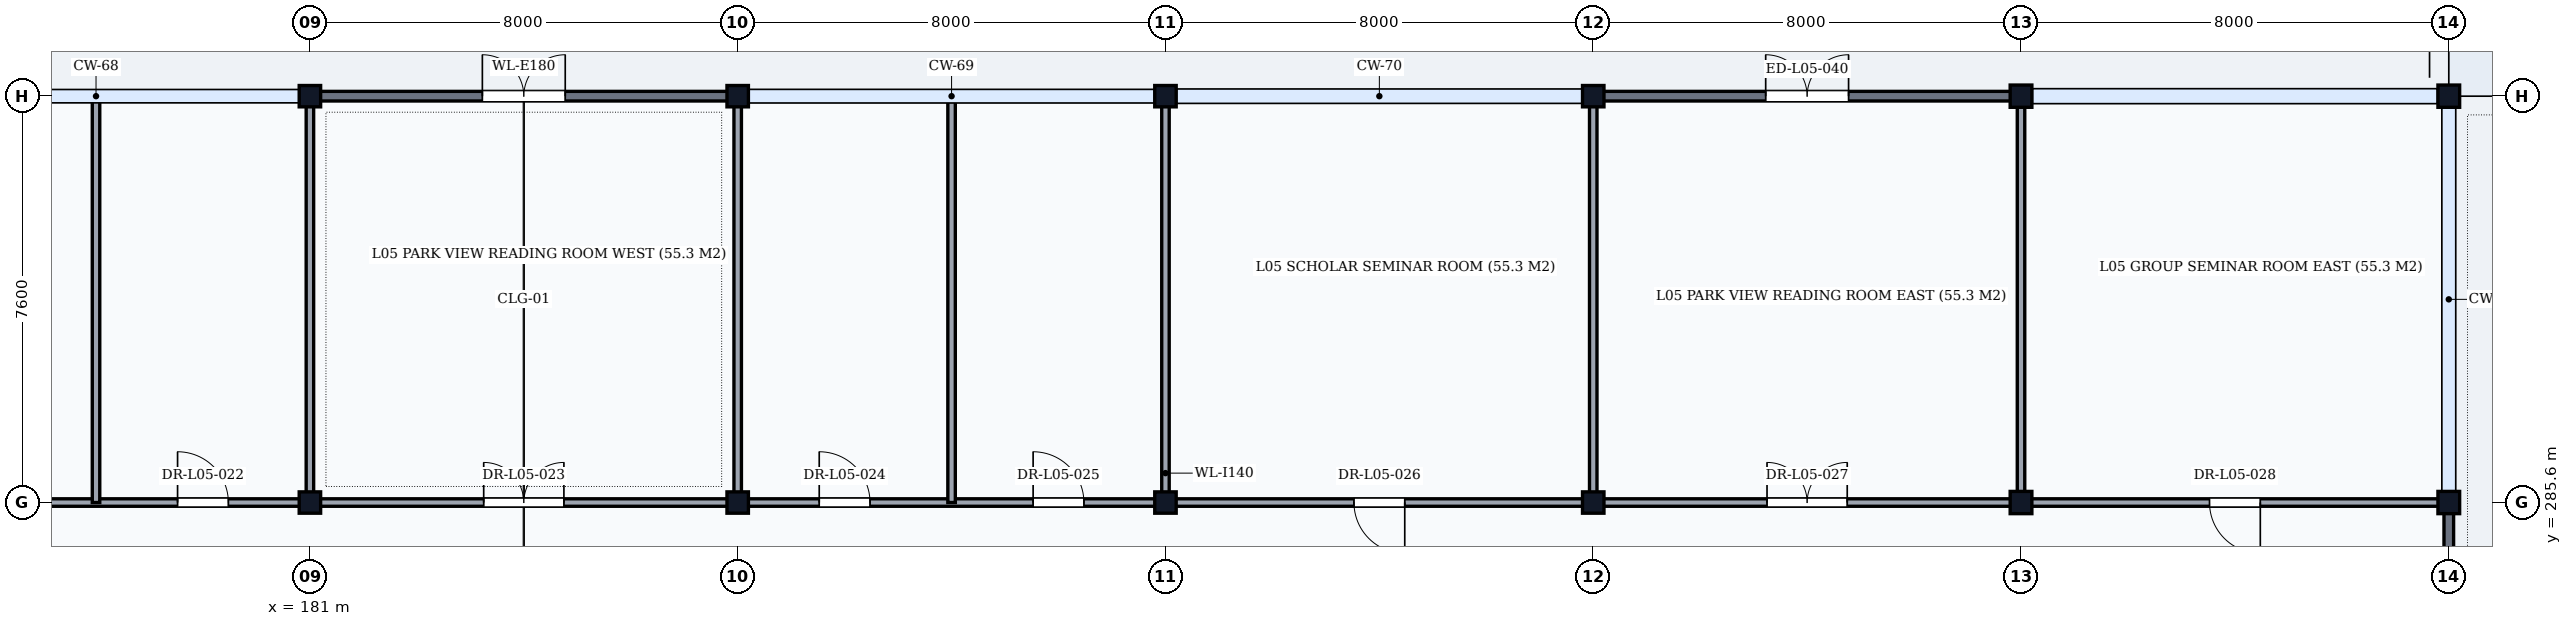
"""IFC4 building model, lengths in metres.
Left out: names, types, materials, properties, quantities, classifications, styles, units other than length and angle.
Written with IfcOpenShell. Run it as: python <this file> out.ifc"""

import sys

from ifc_helpers import new_model, si_unit, direction, frame, frame_2d, origin, origin_2d, place, context, subcontext, project, spatial, rectangle, i_section, extrude, element, fill, save


model = new_model("IFC4")
c1 = context("Model", 3, precision=1e-05, world=origin(), true_north=direction((0.0, 1.0)))
c2 = subcontext(c1, "Body", "Model", "MODEL_VIEW")
j1 = project(units=[si_unit("LENGTHUNIT", "METRE"), si_unit("PLANEANGLEUNIT", "RADIAN")], contexts=[c1])
p1 = place(None, origin())
s1 = spatial("IfcSite", under=j1, at=p1, CompositionType="ELEMENT")
p2 = place(p1, origin())
s2 = spatial("IfcBuilding", under=s1, at=p2, CompositionType="ELEMENT")
p3 = place(p2, frame((0.0, 0.0, 20.4)))
s3 = spatial("IfcBuildingStorey", under=s2, at=p3, CompositionType="ELEMENT", Elevation=20.4)
for number, where, z_axis, x_axis in (
    (1, (181.0, 285.6, 0.0), (0.0, 0.0, 1.0), (1.0, 0.0, 0.0)),
    (2, (181.0, 293.2, 0.0), (0.0, 0.0, 1.0), (1.0, 0.0, 0.0)),
    (3, (189.0, 285.6, 0.0), (0.0, 0.0, 1.0), (1.0, 0.0, 0.0)),
    (4, (189.0, 293.2, 0.0), (0.0, 0.0, 1.0), (1.0, 0.0, 0.0)),
    (5, (197.0, 285.6, 0.0), (0.0, 0.0, 1.0), (1.0, 0.0, 0.0)),
    (6, (197.0, 293.2, 0.0), (0.0, 0.0, 1.0), (1.0, 0.0, 0.0)),
    (7, (205.0, 285.6, 0.0), (0.0, 0.0, 1.0), (1.0, 0.0, 0.0)),
    (8, (205.0, 293.2, 0.0), (0.0, 0.0, 1.0), (1.0, 0.0, 0.0)),
):
    element("IfcColumn", number, at=place(p3, frame(where, z_axis=z_axis, x_axis=x_axis)), inside=s3, PredefinedType="COLUMN", context=c2, shape_type="SweptSolid", body=[
        extrude(i_section(OverallWidth=0.401, OverallDepth=0.399, WebThickness=0.025, FlangeThickness=0.04, FilletRadius=0.015, at=origin_2d()), origin(), (0.0, 0.0, 1.0), 3.9),
    ])
for number, where, z_axis, x_axis in (
    (9, (213.0, 285.6, 0.0), (0.0, 0.0, 1.0), (1.0, 0.0, 0.0)),
    (10, (213.0, 293.2, 0.0), (0.0, 0.0, 1.0), (1.0, 0.0, 0.0)),
    (11, (221.0, 285.6, 0.0), (0.0, 0.0, 1.0), (1.0, 0.0, 0.0)),
    (12, (221.0, 293.2, 0.0), (0.0, 0.0, 1.0), (1.0, 0.0, 0.0)),
):
    element("IfcColumn", number, at=place(p3, frame(where, z_axis=z_axis, x_axis=x_axis)), inside=s3, PredefinedType="COLUMN", context=c2, shape_type="SweptSolid", body=[
        extrude(i_section(OverallWidth=0.406, OverallDepth=0.416, WebThickness=0.03, FlangeThickness=0.048, FilletRadius=0.015, at=origin_2d()), origin(), (0.0, 0.0, 1.0), 3.9),
    ])
p4 = place(p3, frame((181.006, 293.2, 0.0), z_axis=(0.0, 0.0, 1.0), x_axis=(1.0, 0.0, 0.0)))
e13 = element("IfcWall", 13, at=p4, inside=s3, PredefinedType="SOLIDWALL", context=c2, shape_type="SweptSolid", body=[
    extrude(rectangle(XDim=7.988, YDim=0.18, at=frame_2d((3.994, 0.0))), origin(), (0.0, 0.0, 1.0), 3.348),
])
p5 = place(p4, frame((3.219, 0.0, 0.0)))
e14 = element("IfcOpeningElement", 14, at=p5, cuts=e13, PredefinedType="OPENING", context=c2, shape_type="SweptSolid", body=[
    extrude(rectangle(XDim=1.55, YDim=2.2, at=frame_2d((0.775, 1.1))), frame((0.0, 0.105, 0.0), z_axis=(0.0, -1.0, 0.0), x_axis=(1.0, 0.0, 0.0)), (0.0, 0.0, 1.0), 0.21),
])
p6 = place(p3, frame((205.006, 293.2, 0.0), z_axis=(0.0, 0.0, 1.0), x_axis=(1.0, 0.0, 0.0)))
e15 = element("IfcWall", 15, at=p6, inside=s3, PredefinedType="SOLIDWALL", context=c2, shape_type="SweptSolid", body=[
    extrude(rectangle(XDim=7.988, YDim=0.18, at=frame_2d((3.994, 0.0))), origin(), (0.0, 0.0, 1.0), 3.348),
])
p7 = place(p6, frame((3.219, 0.0, 0.0)))
e16 = element("IfcOpeningElement", 16, at=p7, cuts=e15, PredefinedType="OPENING", context=c2, shape_type="SweptSolid", body=[
    extrude(rectangle(XDim=1.55, YDim=2.2, at=frame_2d((0.775, 1.1))), frame((0.0, 0.105, 0.0), z_axis=(0.0, -1.0, 0.0), x_axis=(1.0, 0.0, 0.0)), (0.0, 0.0, 1.0), 0.21),
])
p8 = place(p3, frame((221.0, 278.006, 0.0), z_axis=(0.0, 0.0, 1.0), x_axis=(0.0, 1.0, 0.0)))
e17 = element("IfcWall", 17, at=p8, inside=s3, PredefinedType="SOLIDWALL", context=c2, shape_type="SweptSolid", body=[
    extrude(rectangle(XDim=7.588, YDim=0.18, at=frame_2d((3.794, 0.0))), origin(), (0.0, 0.0, 1.0), 3.388),
])
p9 = place(p8, frame((1.522, 0.0, 0.95)))
e18 = element("IfcOpeningElement", 18, at=p9, cuts=e17, PredefinedType="OPENING", context=c2, shape_type="SweptSolid", body=[
    extrude(rectangle(XDim=2.0, YDim=2.1, at=frame_2d((1.0, 1.05))), frame((0.0, 0.105, 0.0), z_axis=(0.0, -1.0, 0.0), x_axis=(1.0, 0.0, 0.0)), (0.0, 0.0, 1.0), 0.21),
])
p10 = place(p3, frame((173.0, 285.6, 0.0), z_axis=(0.0, 0.0, 1.0), x_axis=(1.0, 0.0, 0.0)))
e19 = element("IfcWall", 19, at=p10, inside=s3, PredefinedType="PARTITIONING", context=c2, shape_type="SweptSolid", body=[
    extrude(rectangle(XDim=48.0, YDim=0.14, at=frame_2d((24.0, 0.0))), origin(), (0.0, 0.0, 1.0), 3.058),
])
p11 = place(p10, frame((1.525, 0.0, 0.0)))
e20 = element("IfcOpeningElement", 20, at=p11, cuts=e19, PredefinedType="OPENING", context=c2, shape_type="SweptSolid", body=[
    extrude(rectangle(XDim=0.95, YDim=2.1, at=frame_2d((0.475, 1.05))), frame((0.0, 0.085, 0.0), z_axis=(0.0, -1.0, 0.0), x_axis=(1.0, 0.0, 0.0)), (0.0, 0.0, 1.0), 0.17),
])
p12 = place(p10, frame((5.525, 0.0, 0.0)))
e21 = element("IfcOpeningElement", 21, at=p12, cuts=e19, PredefinedType="OPENING", context=c2, shape_type="SweptSolid", body=[
    extrude(rectangle(XDim=0.95, YDim=2.1, at=frame_2d((0.475, 1.05))), frame((0.0, 0.085, 0.0), z_axis=(0.0, -1.0, 0.0), x_axis=(1.0, 0.0, 0.0)), (0.0, 0.0, 1.0), 0.17),
])
p13 = place(p10, frame((11.25, 0.0, 0.0)))
e22 = element("IfcOpeningElement", 22, at=p13, cuts=e19, PredefinedType="OPENING", context=c2, shape_type="SweptSolid", body=[
    extrude(rectangle(XDim=1.5, YDim=2.25, at=frame_2d((0.75, 1.125))), frame((0.0, 0.085, 0.0), z_axis=(0.0, -1.0, 0.0), x_axis=(1.0, 0.0, 0.0)), (0.0, 0.0, 1.0), 0.17),
])
p14 = place(p10, frame((17.525, 0.0, 0.0)))
e23 = element("IfcOpeningElement", 23, at=p14, cuts=e19, PredefinedType="OPENING", context=c2, shape_type="SweptSolid", body=[
    extrude(rectangle(XDim=0.95, YDim=2.1, at=frame_2d((0.475, 1.05))), frame((0.0, 0.085, 0.0), z_axis=(0.0, -1.0, 0.0), x_axis=(1.0, 0.0, 0.0)), (0.0, 0.0, 1.0), 0.17),
])
p15 = place(p10, frame((21.525, 0.0, 0.0)))
e24 = element("IfcOpeningElement", 24, at=p15, cuts=e19, PredefinedType="OPENING", context=c2, shape_type="SweptSolid", body=[
    extrude(rectangle(XDim=0.95, YDim=2.1, at=frame_2d((0.475, 1.05))), frame((0.0, 0.085, 0.0), z_axis=(0.0, -1.0, 0.0), x_axis=(1.0, 0.0, 0.0)), (0.0, 0.0, 1.0), 0.17),
])
p16 = place(p10, frame((27.525, 0.0, 0.0)))
e25 = element("IfcOpeningElement", 25, at=p16, cuts=e19, PredefinedType="OPENING", context=c2, shape_type="SweptSolid", body=[
    extrude(rectangle(XDim=0.95, YDim=2.1, at=frame_2d((0.475, 1.05))), frame((0.0, 0.085, 0.0), z_axis=(0.0, -1.0, 0.0), x_axis=(1.0, 0.0, 0.0)), (0.0, 0.0, 1.0), 0.17),
])
p17 = place(p10, frame((35.25, 0.0, 0.0)))
e26 = element("IfcOpeningElement", 26, at=p17, cuts=e19, PredefinedType="OPENING", context=c2, shape_type="SweptSolid", body=[
    extrude(rectangle(XDim=1.5, YDim=2.25, at=frame_2d((0.75, 1.125))), frame((0.0, 0.085, 0.0), z_axis=(0.0, -1.0, 0.0), x_axis=(1.0, 0.0, 0.0)), (0.0, 0.0, 1.0), 0.17),
])
p18 = place(p10, frame((43.525, 0.0, 0.0)))
e27 = element("IfcOpeningElement", 27, at=p18, cuts=e19, PredefinedType="OPENING", context=c2, shape_type="SweptSolid", body=[
    extrude(rectangle(XDim=0.95, YDim=2.1, at=frame_2d((0.475, 1.05))), frame((0.0, 0.085, 0.0), z_axis=(0.0, -1.0, 0.0), x_axis=(1.0, 0.0, 0.0)), (0.0, 0.0, 1.0), 0.17),
])
p19 = place(p3, frame((177.0, 285.6, 0.0), z_axis=(0.0, 0.0, 1.0), x_axis=(0.0, 1.0, 0.0)))
e28 = element("IfcWall", 28, at=p19, inside=s3, PredefinedType="PARTITIONING", context=c2, shape_type="SweptSolid", body=[
    extrude(rectangle(XDim=7.6, YDim=0.14, at=frame_2d((3.8, 0.0))), origin(), (0.0, 0.0, 1.0), 3.388),
])
for number, where, z_axis, x_axis in (
    (29, (181.0, 285.6, 0.0), (0.0, 0.0, 1.0), (0.0, 1.0, 0.0)),
    (30, (189.0, 285.6, 0.0), (0.0, 0.0, 1.0), (0.0, 1.0, 0.0)),
):
    element("IfcWall", number, at=place(p3, frame(where, z_axis=z_axis, x_axis=x_axis)), inside=s3, PredefinedType="PARTITIONING", context=c2, shape_type="SweptSolid", body=[
        extrude(rectangle(XDim=7.6, YDim=0.14, at=frame_2d((3.8, 0.0))), origin(), (0.0, 0.0, 1.0), 3.208),
    ])
p20 = place(p3, frame((193.0, 285.6, 0.0), z_axis=(0.0, 0.0, 1.0), x_axis=(0.0, 1.0, 0.0)))
e31 = element("IfcWall", 31, at=p20, inside=s3, PredefinedType="PARTITIONING", context=c2, shape_type="SweptSolid", body=[
    extrude(rectangle(XDim=7.6, YDim=0.14, at=frame_2d((3.8, 0.0))), origin(), (0.0, 0.0, 1.0), 3.388),
])
for number, where, z_axis, x_axis in (
    (32, (197.0, 285.6, 0.0), (0.0, 0.0, 1.0), (0.0, 1.0, 0.0)),
    (33, (205.0, 285.6, 0.0), (0.0, 0.0, 1.0), (0.0, 1.0, 0.0)),
    (34, (213.0, 285.6, 0.0), (0.0, 0.0, 1.0), (0.0, 1.0, 0.0)),
):
    element("IfcWall", number, at=place(p3, frame(where, z_axis=z_axis, x_axis=x_axis)), inside=s3, PredefinedType="PARTITIONING", context=c2, shape_type="SweptSolid", body=[
        extrude(rectangle(XDim=7.6, YDim=0.14, at=frame_2d((3.8, 0.0))), origin(), (0.0, 0.0, 1.0), 3.208),
    ])
p21 = place(p5, origin())
e35 = element("IfcDoor", 35, at=p21, inside=s3, OperationType="DOUBLE_DOOR_SINGLE_SWING", PredefinedType="DOOR", context=c2, shape_type="SweptSolid", body=[
    extrude(rectangle(XDim=1.55, YDim=2.2, at=frame_2d((0.775, 1.1))), frame((0.0, 0.025, 0.0), z_axis=(0.0, -1.0, 0.0), x_axis=(1.0, 0.0, 0.0)), (0.0, 0.0, 1.0), 0.05),
])
fill(e14, e35)
p22 = place(p7, origin())
e36 = element("IfcDoor", 36, at=p22, inside=s3, OperationType="DOUBLE_DOOR_SINGLE_SWING", PredefinedType="DOOR", context=c2, shape_type="SweptSolid", body=[
    extrude(rectangle(XDim=1.55, YDim=2.2, at=frame_2d((0.775, 1.1))), frame((0.0, 0.025, 0.0), z_axis=(0.0, -1.0, 0.0), x_axis=(1.0, 0.0, 0.0)), (0.0, 0.0, 1.0), 0.05),
])
fill(e16, e36)
p23 = place(p12, origin())
e37 = element("IfcDoor", 37, at=p23, inside=s3, OperationType="SINGLE_SWING_LEFT", PredefinedType="DOOR", context=c2, shape_type="SweptSolid", body=[
    extrude(rectangle(XDim=0.95, YDim=2.1, at=frame_2d((0.475, 1.05))), frame((0.0, 0.025, 0.0), z_axis=(0.0, -1.0, 0.0), x_axis=(1.0, 0.0, 0.0)), (0.0, 0.0, 1.0), 0.05),
])
fill(e21, e37)
p24 = place(p13, origin())
e38 = element("IfcDoor", 38, at=p24, inside=s3, OperationType="DOUBLE_DOOR_SINGLE_SWING", PredefinedType="DOOR", context=c2, shape_type="SweptSolid", body=[
    extrude(rectangle(XDim=1.5, YDim=2.25, at=frame_2d((0.75, 1.125))), frame((0.0, 0.025, 0.0), z_axis=(0.0, -1.0, 0.0), x_axis=(1.0, 0.0, 0.0)), (0.0, 0.0, 1.0), 0.05),
])
fill(e22, e38)
p25 = place(p14, origin())
e39 = element("IfcDoor", 39, at=p25, inside=s3, OperationType="SINGLE_SWING_LEFT", PredefinedType="DOOR", context=c2, shape_type="SweptSolid", body=[
    extrude(rectangle(XDim=0.95, YDim=2.1, at=frame_2d((0.475, 1.05))), frame((0.0, 0.025, 0.0), z_axis=(0.0, -1.0, 0.0), x_axis=(1.0, 0.0, 0.0)), (0.0, 0.0, 1.0), 0.05),
])
fill(e23, e39)
p26 = place(p15, origin())
e40 = element("IfcDoor", 40, at=p26, inside=s3, OperationType="SINGLE_SWING_LEFT", PredefinedType="DOOR", context=c2, shape_type="SweptSolid", body=[
    extrude(rectangle(XDim=0.95, YDim=2.1, at=frame_2d((0.475, 1.05))), frame((0.0, 0.025, 0.0), z_axis=(0.0, -1.0, 0.0), x_axis=(1.0, 0.0, 0.0)), (0.0, 0.0, 1.0), 0.05),
])
fill(e24, e40)
p27 = place(p16, origin())
e41 = element("IfcDoor", 41, at=p27, inside=s3, OperationType="SINGLE_SWING_RIGHT", PredefinedType="DOOR", context=c2, shape_type="SweptSolid", body=[
    extrude(rectangle(XDim=0.95, YDim=2.1, at=frame_2d((0.475, 1.05))), frame((0.0, 0.025, 0.0), z_axis=(0.0, -1.0, 0.0), x_axis=(1.0, 0.0, 0.0)), (0.0, 0.0, 1.0), 0.05),
])
fill(e25, e41)
p28 = place(p17, origin())
e42 = element("IfcDoor", 42, at=p28, inside=s3, OperationType="DOUBLE_DOOR_SINGLE_SWING", PredefinedType="DOOR", context=c2, shape_type="SweptSolid", body=[
    extrude(rectangle(XDim=1.5, YDim=2.25, at=frame_2d((0.75, 1.125))), frame((0.0, 0.025, 0.0), z_axis=(0.0, -1.0, 0.0), x_axis=(1.0, 0.0, 0.0)), (0.0, 0.0, 1.0), 0.05),
])
fill(e26, e42)
p29 = place(p18, origin())
e43 = element("IfcDoor", 43, at=p29, inside=s3, OperationType="SINGLE_SWING_RIGHT", PredefinedType="DOOR", context=c2, shape_type="SweptSolid", body=[
    extrude(rectangle(XDim=0.95, YDim=2.1, at=frame_2d((0.475, 1.05))), frame((0.0, 0.025, 0.0), z_axis=(0.0, -1.0, 0.0), x_axis=(1.0, 0.0, 0.0)), (0.0, 0.0, 1.0), 0.05),
])
fill(e27, e43)
save(model, sys.argv[1])
